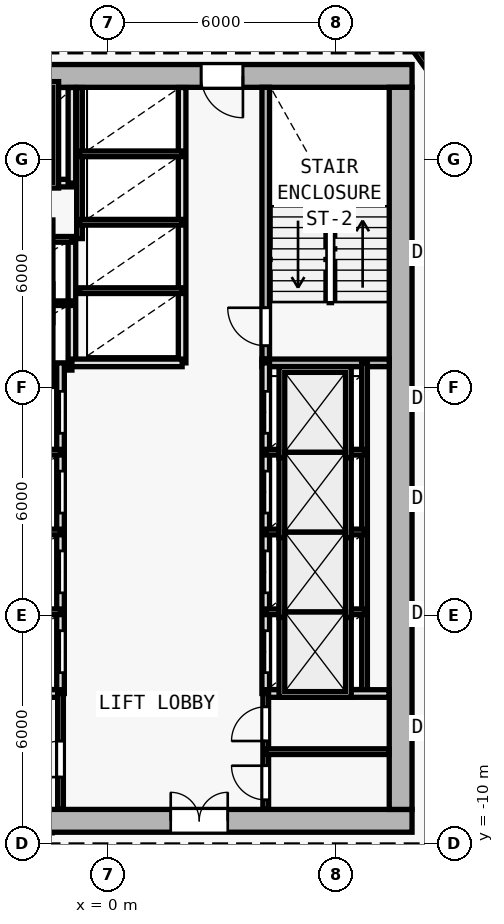
"""IFC4 building model, lengths in metres.
Left out: names, types, materials, properties, quantities, classifications, styles, units other than length and angle.
Written with IfcOpenShell. Run it as: python <this file> out.ifc"""

import sys

from ifc_helpers import new_model, si_unit, direction, frame, frame_2d, origin, origin_2d, place, context, subcontext, project, spatial, rectangle, i_section, extrude, element, fill, save


model = new_model("IFC4")
c1 = context("Model", 3, precision=1e-05, world=origin(), true_north=direction((0.0, 1.0)))
c2 = subcontext(c1, "Body", "Model", "MODEL_VIEW")
j1 = project(units=[si_unit("LENGTHUNIT", "METRE"), si_unit("PLANEANGLEUNIT", "RADIAN")], contexts=[c1])
p1 = place(None, origin())
s1 = spatial("IfcSite", under=j1, at=p1, CompositionType="ELEMENT")
p2 = place(p1, origin())
s2 = spatial("IfcBuilding", under=s1, at=p2, CompositionType="ELEMENT")
p3 = place(p2, frame((0.0, 0.0, 93.3)))
s3 = spatial("IfcBuildingStorey", under=s2, at=p3, CompositionType="ELEMENT", Elevation=93.3)
for number, where, z_axis, x_axis in (
    (1, (7.7, -9.4, 0.0), (0.0, 0.0, 1.0), (1.0, 0.0, 0.0)),
    (2, (7.7, 10.2, 0.0), (0.0, 0.0, 1.0), (1.0, 0.0, 0.0)),
    (3, (0.0, -9.4, 0.0), (0.0, 0.0, 1.0), (1.0, 0.0, 0.0)),
    (4, (7.7, 0.4, 0.0), (0.0, 0.0, 1.0), (1.0, 0.0, 0.0)),
):
    element("IfcColumn", number, at=place(p3, frame(where, z_axis=z_axis, x_axis=x_axis)), inside=s3, PredefinedType="COLUMN", context=c2, shape_type="SweptSolid", body=[
        extrude(i_section(OverallWidth=0.409, OverallDepth=0.425, WebThickness=0.021, FlangeThickness=0.034, FilletRadius=0.015, at=origin_2d()), origin(), (0.0, 0.0, 1.0), 3.6),
    ])
p4 = place(p3, frame((-8.0, -9.4, 0.0), z_axis=(0.0, 0.0, 1.0), x_axis=(1.0, 0.0, 0.0)))
e5 = element("IfcWall", 5, at=p4, inside=s3, PredefinedType="SHEAR", context=c2, shape_type="SweptSolid", body=[
    extrude(rectangle(XDim=16.0, YDim=0.6, at=frame_2d((8.0, 0.0))), origin(), (0.0, 0.0, 1.0), 3.35),
])
p5 = place(p4, frame((9.65, 0.0, 0.0)))
e6 = element("IfcOpeningElement", 6, at=p5, cuts=e5, PredefinedType="OPENING", context=c2, shape_type="SweptSolid", body=[
    extrude(rectangle(XDim=1.5, YDim=2.2, at=frame_2d((0.75, 1.1))), frame((0.0, 0.31, 0.0), z_axis=(0.0, -1.0, 0.0), x_axis=(1.0, 0.0, 0.0)), (0.0, 0.0, 1.0), 0.62),
])
p6 = place(p3, frame((8.0, 10.2, 0.0), z_axis=(0.0, 0.0, 1.0), x_axis=(-1.0, 0.0, 0.0)))
e7 = element("IfcWall", 7, at=p6, inside=s3, PredefinedType="SHEAR", context=c2, shape_type="SweptSolid", body=[
    extrude(rectangle(XDim=16.0, YDim=0.6, at=frame_2d((8.0, 0.0))), origin(), (0.0, 0.0, 1.0), 3.35),
])
p7 = place(p6, frame((4.45, 0.0, 0.0)))
e8 = element("IfcOpeningElement", 8, at=p7, cuts=e7, PredefinedType="OPENING", context=c2, shape_type="SweptSolid", body=[
    extrude(rectangle(XDim=1.1, YDim=2.15, at=frame_2d((0.55, 1.075))), frame((0.0, 0.31, 0.0), z_axis=(0.0, -1.0, 0.0), x_axis=(1.0, 0.0, 0.0)), (0.0, 0.0, 1.0), 0.62),
])
p8 = place(p3, frame((7.7, 9.9, 0.0), z_axis=(0.0, 0.0, 1.0), x_axis=(0.0, -1.0, 0.0)))
e9 = element("IfcWall", 9, at=p8, inside=s3, PredefinedType="SHEAR", context=c2, shape_type="SweptSolid", body=[
    extrude(rectangle(XDim=19.0, YDim=0.6, at=frame_2d((9.5, 0.0))), origin(), (0.0, 0.0, 1.0), 3.35),
])
p9 = place(p3, frame((4.15, 2.75, 0.0), z_axis=(0.0, 0.0, 1.0), x_axis=(0.0, 1.0, 0.0)))
e10 = element("IfcWall", 10, at=p9, inside=s3, PredefinedType="SOLIDWALL", context=c2, shape_type="SweptSolid", body=[
    extrude(rectangle(XDim=7.15, YDim=0.2, at=frame_2d((3.575, 0.0))), origin(), (0.0, 0.0, 1.0), 3.35),
])
p10 = place(p9, frame((0.35, 0.0, 0.0)))
e11 = element("IfcOpeningElement", 11, at=p10, cuts=e10, PredefinedType="OPENING", context=c2, shape_type="SweptSolid", body=[
    extrude(rectangle(XDim=1.0, YDim=2.15, at=frame_2d((0.5, 1.075))), frame((0.0, 0.11, 0.0), z_axis=(0.0, -1.0, 0.0), x_axis=(1.0, 0.0, 0.0)), (0.0, 0.0, 1.0), 0.22),
])
p11 = place(p3, frame((4.05, 2.65, 0.0), z_axis=(0.0, 0.0, 1.0), x_axis=(1.0, 0.0, 0.0)))
e12 = element("IfcWall", 12, at=p11, inside=s3, PredefinedType="SOLIDWALL", context=c2, shape_type="SweptSolid", body=[
    extrude(rectangle(XDim=3.35, YDim=0.2, at=frame_2d((1.675, 0.0))), origin(), (0.0, 0.0, 1.0), 3.35),
])
p12 = place(p3, frame((-0.95, 2.65, 0.0), z_axis=(0.0, 0.0, 1.0), x_axis=(0.0, 1.0, 0.0)))
e13 = element("IfcWall", 13, at=p12, inside=s3, PredefinedType="SOLIDWALL", context=c2, shape_type="SweptSolid", body=[
    extrude(rectangle(XDim=3.27, YDim=0.2, at=frame_2d((1.635, 0.0))), origin(), (0.0, 0.0, 1.0), 3.35),
])
for number, where, z_axis, x_axis in (
    (14, (-3.85, 2.52, 0.0), (0.0, 0.0, 1.0), (1.0, 0.0, 0.0)),
    (15, (-3.85, 4.22, 0.0), (0.0, 0.0, 1.0), (1.0, 0.0, 0.0)),
):
    element("IfcWall", number, at=place(p3, frame(where, z_axis=z_axis, x_axis=x_axis)), inside=s3, PredefinedType="PARTITIONING", context=c2, shape_type="SweptSolid", body=[
        extrude(rectangle(XDim=2.9, YDim=0.12, at=frame_2d((1.45, 0.0))), origin(), (0.0, 0.0, 1.0), 3.35),
    ])
p13 = place(p3, frame((-3.85, 5.9, 0.0), z_axis=(0.0, 0.0, 1.0), x_axis=(1.0, 0.0, 0.0)))
e16 = element("IfcWall", 16, at=p13, inside=s3, PredefinedType="PARTITIONING", context=c2, shape_type="SweptSolid", body=[
    extrude(rectangle(XDim=2.9, YDim=0.15, at=frame_2d((1.45, 0.0))), origin(), (0.0, 0.0, 1.0), 3.35),
])
p14 = place(p3, frame((-3.85, 7.38, 0.0), z_axis=(0.0, 0.0, 1.0), x_axis=(1.0, 0.0, 0.0)))
e17 = element("IfcWall", 17, at=p14, inside=s3, PredefinedType="SOLIDWALL", context=c2, shape_type="SweptSolid", body=[
    extrude(rectangle(XDim=2.9, YDim=0.2, at=frame_2d((1.45, 0.0))), origin(), (0.0, 0.0, 1.0), 3.35),
])
p15 = place(p14, frame((0.85, 0.0, 0.0)))
e18 = element("IfcOpeningElement", 18, at=p15, cuts=e17, PredefinedType="OPENING", context=c2, shape_type="SweptSolid", body=[
    extrude(rectangle(XDim=1.2, YDim=2.2, at=frame_2d((0.6, 1.1))), frame((0.0, 0.11, 0.0), z_axis=(0.0, -1.0, 0.0), x_axis=(1.0, 0.0, 0.0)), (0.0, 0.0, 1.0), 0.22),
])
p16 = place(p3, frame((-0.95, 7.38, 0.0), z_axis=(0.0, 0.0, 1.0), x_axis=(0.0, 1.0, 0.0)))
e19 = element("IfcWall", 19, at=p16, inside=s3, PredefinedType="SOLIDWALL", context=c2, shape_type="SweptSolid", body=[
    extrude(rectangle(XDim=2.515, YDim=0.2, at=frame_2d((1.258, 0.0))), origin(), (0.0, 0.0, 1.0), 3.35),
])
p17 = place(p3, frame((4.15, -6.05, 0.0), z_axis=(0.0, 0.0, 1.0), x_axis=(0.0, 1.0, 0.0)))
e20 = element("IfcWall", 20, at=p17, inside=s3, PredefinedType="SOLIDWALL", context=c2, shape_type="SweptSolid", body=[
    extrude(rectangle(XDim=8.7, YDim=0.2, at=frame_2d((4.35, 0.0))), origin(), (0.0, 0.0, 1.0), 3.35),
])
p18 = place(p17, frame((0.55, 0.0, 0.0)))
e21 = element("IfcOpeningElement", 21, at=p18, cuts=e20, PredefinedType="OPENING", context=c2, shape_type="SweptSolid", body=[
    extrude(rectangle(XDim=1.1, YDim=2.15, at=frame_2d((0.55, 1.075))), frame((0.0, 0.11, 0.0), z_axis=(0.0, -1.0, 0.0), x_axis=(1.0, 0.0, 0.0)), (0.0, 0.0, 1.0), 0.22),
])
p19 = place(p17, frame((2.65, 0.0, 0.0)))
e22 = element("IfcOpeningElement", 22, at=p19, cuts=e20, PredefinedType="OPENING", context=c2, shape_type="SweptSolid", body=[
    extrude(rectangle(XDim=1.1, YDim=2.15, at=frame_2d((0.55, 1.075))), frame((0.0, 0.11, 0.0), z_axis=(0.0, -1.0, 0.0), x_axis=(1.0, 0.0, 0.0)), (0.0, 0.0, 1.0), 0.22),
])
p20 = place(p17, frame((4.75, 0.0, 0.0)))
e23 = element("IfcOpeningElement", 23, at=p20, cuts=e20, PredefinedType="OPENING", context=c2, shape_type="SweptSolid", body=[
    extrude(rectangle(XDim=1.1, YDim=2.15, at=frame_2d((0.55, 1.075))), frame((0.0, 0.11, 0.0), z_axis=(0.0, -1.0, 0.0), x_axis=(1.0, 0.0, 0.0)), (0.0, 0.0, 1.0), 0.22),
])
p21 = place(p17, frame((6.85, 0.0, 0.0)))
e24 = element("IfcOpeningElement", 24, at=p21, cuts=e20, PredefinedType="OPENING", context=c2, shape_type="SweptSolid", body=[
    extrude(rectangle(XDim=1.1, YDim=2.15, at=frame_2d((0.55, 1.075))), frame((0.0, 0.11, 0.0), z_axis=(0.0, -1.0, 0.0), x_axis=(1.0, 0.0, 0.0)), (0.0, 0.0, 1.0), 0.22),
])
p22 = place(p3, frame((6.75, -6.05, 0.0), z_axis=(0.0, 0.0, 1.0), x_axis=(0.0, 1.0, 0.0)))
e25 = element("IfcWall", 25, at=p22, inside=s3, PredefinedType="PARTITIONING", context=c2, shape_type="SweptSolid", body=[
    extrude(rectangle(XDim=8.7, YDim=0.15, at=frame_2d((4.35, 0.0))), origin(), (0.0, 0.0, 1.0), 3.35),
])
for number, where, z_axis, x_axis in (
    (26, (4.15, -3.9, 0.0), (0.0, 0.0, 1.0), (1.0, 0.0, 0.0)),
    (27, (4.15, -1.8, 0.0), (0.0, 0.0, 1.0), (1.0, 0.0, 0.0)),
    (28, (4.15, 0.3, 0.0), (0.0, 0.0, 1.0), (1.0, 0.0, 0.0)),
):
    element("IfcWall", number, at=place(p3, frame(where, z_axis=z_axis, x_axis=x_axis)), inside=s3, PredefinedType="PARTITIONING", context=c2, shape_type="SweptSolid", body=[
        extrude(rectangle(XDim=2.6, YDim=0.15, at=frame_2d((1.3, 0.0))), origin(), (0.0, 0.0, 1.0), 3.35),
    ])
p23 = place(p3, frame((-1.25, -6.05, 0.0), z_axis=(0.0, 0.0, 1.0), x_axis=(0.0, 1.0, 0.0)))
e29 = element("IfcWall", 29, at=p23, inside=s3, PredefinedType="SOLIDWALL", context=c2, shape_type="SweptSolid", body=[
    extrude(rectangle(XDim=8.7, YDim=0.2, at=frame_2d((4.35, 0.0))), origin(), (0.0, 0.0, 1.0), 3.35),
])
p24 = place(p23, frame((0.55, 0.0, 0.0)))
e30 = element("IfcOpeningElement", 30, at=p24, cuts=e29, PredefinedType="OPENING", context=c2, shape_type="SweptSolid", body=[
    extrude(rectangle(XDim=1.1, YDim=2.15, at=frame_2d((0.55, 1.075))), frame((0.0, 0.11, 0.0), z_axis=(0.0, -1.0, 0.0), x_axis=(1.0, 0.0, 0.0)), (0.0, 0.0, 1.0), 0.22),
])
p25 = place(p23, frame((2.65, 0.0, 0.0)))
e31 = element("IfcOpeningElement", 31, at=p25, cuts=e29, PredefinedType="OPENING", context=c2, shape_type="SweptSolid", body=[
    extrude(rectangle(XDim=1.1, YDim=2.15, at=frame_2d((0.55, 1.075))), frame((0.0, 0.11, 0.0), z_axis=(0.0, -1.0, 0.0), x_axis=(1.0, 0.0, 0.0)), (0.0, 0.0, 1.0), 0.22),
])
p26 = place(p23, frame((4.75, 0.0, 0.0)))
e32 = element("IfcOpeningElement", 32, at=p26, cuts=e29, PredefinedType="OPENING", context=c2, shape_type="SweptSolid", body=[
    extrude(rectangle(XDim=1.1, YDim=2.15, at=frame_2d((0.55, 1.075))), frame((0.0, 0.11, 0.0), z_axis=(0.0, -1.0, 0.0), x_axis=(1.0, 0.0, 0.0)), (0.0, 0.0, 1.0), 0.22),
])
p27 = place(p23, frame((6.85, 0.0, 0.0)))
e33 = element("IfcOpeningElement", 33, at=p27, cuts=e29, PredefinedType="OPENING", context=c2, shape_type="SweptSolid", body=[
    extrude(rectangle(XDim=1.1, YDim=2.15, at=frame_2d((0.55, 1.075))), frame((0.0, 0.11, 0.0), z_axis=(0.0, -1.0, 0.0), x_axis=(1.0, 0.0, 0.0)), (0.0, 0.0, 1.0), 0.22),
])
for number, where, z_axis, x_axis in (
    (34, (-4.15, -3.9, 0.0), (0.0, 0.0, 1.0), (1.0, 0.0, 0.0)),
    (35, (-4.15, -1.8, 0.0), (0.0, 0.0, 1.0), (1.0, 0.0, 0.0)),
    (36, (-4.15, 0.3, 0.0), (0.0, 0.0, 1.0), (1.0, 0.0, 0.0)),
):
    element("IfcWall", number, at=place(p3, frame(where, z_axis=z_axis, x_axis=x_axis)), inside=s3, PredefinedType="PARTITIONING", context=c2, shape_type="SweptSolid", body=[
        extrude(rectangle(XDim=2.9, YDim=0.15, at=frame_2d((1.45, 0.0))), origin(), (0.0, 0.0, 1.0), 3.35),
    ])
p28 = place(p3, frame((1.95, 2.65, 0.0), z_axis=(0.0, 0.0, 1.0), x_axis=(0.0, 1.0, 0.0)))
e37 = element("IfcWall", 37, at=p28, inside=s3, PredefinedType="SOLIDWALL", context=c2, shape_type="SweptSolid", body=[
    extrude(rectangle(XDim=7.245, YDim=0.2, at=frame_2d((3.623, 0.0))), origin(), (0.0, 0.0, 1.0), 3.35),
])
p29 = place(p3, frame((-0.95, 2.65, 0.0), z_axis=(0.0, 0.0, 1.0), x_axis=(1.0, 0.0, 0.0)))
e38 = element("IfcWall", 38, at=p29, inside=s3, PredefinedType="SOLIDWALL", context=c2, shape_type="SweptSolid", body=[
    extrude(rectangle(XDim=2.9, YDim=0.2, at=frame_2d((1.45, 0.0))), origin(), (0.0, 0.0, 1.0), 3.35),
])
p30 = place(p3, frame((-0.75, 5.92, 0.0), z_axis=(0.0, 0.0, 1.0), x_axis=(0.0, 1.0, 0.0)))
e39 = element("IfcWall", 39, at=p30, inside=s3, PredefinedType="PARTITIONING", context=c2, shape_type="SweptSolid", body=[
    extrude(rectangle(XDim=3.975, YDim=0.15, at=frame_2d((1.988, 0.0))), origin(), (0.0, 0.0, 1.0), 3.35),
])
for number, where, z_axis, x_axis in (
    (40, (-0.75, 4.55, 0.0), (0.0, 0.0, 1.0), (1.0, 0.0, 0.0)),
    (41, (-0.75, 6.35, 0.0), (0.0, 0.0, 1.0), (1.0, 0.0, 0.0)),
    (42, (-0.75, 8.15, 0.0), (0.0, 0.0, 1.0), (1.0, 0.0, 0.0)),
):
    element("IfcWall", number, at=place(p3, frame(where, z_axis=z_axis, x_axis=x_axis)), inside=s3, PredefinedType="PARTITIONING", context=c2, shape_type="SweptSolid", body=[
        extrude(rectangle(XDim=2.7, YDim=0.15, at=frame_2d((1.35, 0.0))), origin(), (0.0, 0.0, 1.0), 3.35),
    ])
p31 = place(p3, frame((-4.04, -6.05, 0.0), z_axis=(0.0, 0.0, 1.0), x_axis=(1.0, 0.0, 0.0)))
e43 = element("IfcWall", 43, at=p31, inside=s3, PredefinedType="SOLIDWALL", context=c2, shape_type="SweptSolid", body=[
    extrude(rectangle(XDim=2.79, YDim=0.2, at=frame_2d((1.395, 0.0))), origin(), (0.0, 0.0, 1.0), 3.35),
])
p32 = place(p3, frame((4.15, -6.05, 0.0), z_axis=(0.0, 0.0, 1.0), x_axis=(1.0, 0.0, 0.0)))
e44 = element("IfcWall", 44, at=p32, inside=s3, PredefinedType="SOLIDWALL", context=c2, shape_type="SweptSolid", body=[
    extrude(rectangle(XDim=3.245, YDim=0.2, at=frame_2d((1.623, 0.0))), origin(), (0.0, 0.0, 1.0), 3.35),
])
p33 = place(p3, frame((-1.25, -9.095, 0.0), z_axis=(0.0, 0.0, 1.0), x_axis=(0.0, 1.0, 0.0)))
e45 = element("IfcWall", 45, at=p33, inside=s3, PredefinedType="PARTITIONING", context=c2, shape_type="SweptSolid", body=[
    extrude(rectangle(XDim=3.045, YDim=0.15, at=frame_2d((1.522, 0.0))), origin(), (0.0, 0.0, 1.0), 3.35),
])
p34 = place(p33, frame((0.845, 0.0, 0.0)))
e46 = element("IfcOpeningElement", 46, at=p34, cuts=e45, PredefinedType="OPENING", context=c2, shape_type="SweptSolid", body=[
    extrude(rectangle(XDim=0.95, YDim=2.1, at=frame_2d((0.475, 1.05))), frame((0.0, 0.085, 0.0), z_axis=(0.0, -1.0, 0.0), x_axis=(1.0, 0.0, 0.0)), (0.0, 0.0, 1.0), 0.17),
])
p35 = place(p3, frame((4.15, -9.095, 0.0), z_axis=(0.0, 0.0, 1.0), x_axis=(0.0, 1.0, 0.0)))
e47 = element("IfcWall", 47, at=p35, inside=s3, PredefinedType="PARTITIONING", context=c2, shape_type="SweptSolid", body=[
    extrude(rectangle(XDim=3.045, YDim=0.15, at=frame_2d((1.522, 0.0))), origin(), (0.0, 0.0, 1.0), 3.35),
])
p36 = place(p35, frame((0.245, 0.0, 0.0)))
e48 = element("IfcOpeningElement", 48, at=p36, cuts=e47, PredefinedType="OPENING", context=c2, shape_type="SweptSolid", body=[
    extrude(rectangle(XDim=0.9, YDim=2.1, at=frame_2d((0.45, 1.05))), frame((0.0, 0.085, 0.0), z_axis=(0.0, -1.0, 0.0), x_axis=(1.0, 0.0, 0.0)), (0.0, 0.0, 1.0), 0.17),
])
p37 = place(p35, frame((1.795, 0.0, 0.0)))
e49 = element("IfcOpeningElement", 49, at=p37, cuts=e47, PredefinedType="OPENING", context=c2, shape_type="SweptSolid", body=[
    extrude(rectangle(XDim=0.9, YDim=2.1, at=frame_2d((0.45, 1.05))), frame((0.0, 0.085, 0.0), z_axis=(0.0, -1.0, 0.0), x_axis=(1.0, 0.0, 0.0)), (0.0, 0.0, 1.0), 0.17),
])
p38 = place(p3, frame((4.15, -7.58, 0.0), z_axis=(0.0, 0.0, 1.0), x_axis=(1.0, 0.0, 0.0)))
e50 = element("IfcWall", 50, at=p38, inside=s3, PredefinedType="PARTITIONING", context=c2, shape_type="SweptSolid", body=[
    extrude(rectangle(XDim=3.245, YDim=0.15, at=frame_2d((1.623, 0.0))), origin(), (0.0, 0.0, 1.0), 3.35),
])
p39 = place(p3, frame((7.041, 12.36, 0.0), z_axis=(0.0, 0.0, 1.0), x_axis=(0.582449511476, -0.812866881218, 0.0)))
e51 = element("IfcWall", 51, at=p39, inside=s3, PredefinedType="PARTITIONING", context=c2, shape_type="SweptSolid", body=[
    extrude(rectangle(XDim=4.84, YDim=0.15, at=frame_2d((2.42, 0.0))), origin(), (0.0, 0.0, 1.0), 2.925),
])
p40 = place(p5, origin())
e52 = element("IfcDoor", 52, at=p40, inside=s3, OperationType="DOUBLE_DOOR_SINGLE_SWING", PredefinedType="DOOR", context=c2, shape_type="SweptSolid", body=[
    extrude(rectangle(XDim=1.5, YDim=2.2, at=frame_2d((0.75, 1.1))), frame((0.0, 0.025, 0.0), z_axis=(0.0, -1.0, 0.0), x_axis=(1.0, 0.0, 0.0)), (0.0, 0.0, 1.0), 0.05),
])
fill(e6, e52)
p41 = place(p7, origin())
e53 = element("IfcDoor", 53, at=p41, inside=s3, OperationType="SINGLE_SWING_LEFT", PredefinedType="DOOR", context=c2, shape_type="SweptSolid", body=[
    extrude(rectangle(XDim=1.1, YDim=2.15, at=frame_2d((0.55, 1.075))), frame((0.0, 0.025, 0.0), z_axis=(0.0, -1.0, 0.0), x_axis=(1.0, 0.0, 0.0)), (0.0, 0.0, 1.0), 0.05),
])
fill(e8, e53)
p42 = place(p10, origin())
e54 = element("IfcDoor", 54, at=p42, inside=s3, OperationType="SINGLE_SWING_RIGHT", PredefinedType="DOOR", context=c2, shape_type="SweptSolid", body=[
    extrude(rectangle(XDim=1.0, YDim=2.15, at=frame_2d((0.5, 1.075))), frame((0.0, 0.025, 0.0), z_axis=(0.0, -1.0, 0.0), x_axis=(1.0, 0.0, 0.0)), (0.0, 0.0, 1.0), 0.05),
])
fill(e11, e54)
p43 = place(p18, origin())
e55 = element("IfcDoor", 55, at=p43, inside=s3, OperationType="DOUBLE_DOOR_SLIDING", PredefinedType="DOOR", context=c2, shape_type="SweptSolid", body=[
    extrude(rectangle(XDim=1.1, YDim=2.15, at=frame_2d((0.55, 1.075))), frame((0.0, 0.025, 0.0), z_axis=(0.0, -1.0, 0.0), x_axis=(1.0, 0.0, 0.0)), (0.0, 0.0, 1.0), 0.05),
])
fill(e21, e55)
p44 = place(p19, origin())
e56 = element("IfcDoor", 56, at=p44, inside=s3, OperationType="DOUBLE_DOOR_SLIDING", PredefinedType="DOOR", context=c2, shape_type="SweptSolid", body=[
    extrude(rectangle(XDim=1.1, YDim=2.15, at=frame_2d((0.55, 1.075))), frame((0.0, 0.025, 0.0), z_axis=(0.0, -1.0, 0.0), x_axis=(1.0, 0.0, 0.0)), (0.0, 0.0, 1.0), 0.05),
])
fill(e22, e56)
p45 = place(p20, origin())
e57 = element("IfcDoor", 57, at=p45, inside=s3, OperationType="DOUBLE_DOOR_SLIDING", PredefinedType="DOOR", context=c2, shape_type="SweptSolid", body=[
    extrude(rectangle(XDim=1.1, YDim=2.15, at=frame_2d((0.55, 1.075))), frame((0.0, 0.025, 0.0), z_axis=(0.0, -1.0, 0.0), x_axis=(1.0, 0.0, 0.0)), (0.0, 0.0, 1.0), 0.05),
])
fill(e23, e57)
p46 = place(p21, origin())
e58 = element("IfcDoor", 58, at=p46, inside=s3, OperationType="DOUBLE_DOOR_SLIDING", PredefinedType="DOOR", context=c2, shape_type="SweptSolid", body=[
    extrude(rectangle(XDim=1.1, YDim=2.15, at=frame_2d((0.55, 1.075))), frame((0.0, 0.025, 0.0), z_axis=(0.0, -1.0, 0.0), x_axis=(1.0, 0.0, 0.0)), (0.0, 0.0, 1.0), 0.05),
])
fill(e24, e58)
p47 = place(p24, origin())
e59 = element("IfcDoor", 59, at=p47, inside=s3, OperationType="DOUBLE_DOOR_SLIDING", PredefinedType="DOOR", context=c2, shape_type="SweptSolid", body=[
    extrude(rectangle(XDim=1.1, YDim=2.15, at=frame_2d((0.55, 1.075))), frame((0.0, 0.025, 0.0), z_axis=(0.0, -1.0, 0.0), x_axis=(1.0, 0.0, 0.0)), (0.0, 0.0, 1.0), 0.05),
])
fill(e30, e59)
p48 = place(p25, origin())
e60 = element("IfcDoor", 60, at=p48, inside=s3, OperationType="DOUBLE_DOOR_SLIDING", PredefinedType="DOOR", context=c2, shape_type="SweptSolid", body=[
    extrude(rectangle(XDim=1.1, YDim=2.15, at=frame_2d((0.55, 1.075))), frame((0.0, 0.025, 0.0), z_axis=(0.0, -1.0, 0.0), x_axis=(1.0, 0.0, 0.0)), (0.0, 0.0, 1.0), 0.05),
])
fill(e31, e60)
p49 = place(p26, origin())
e61 = element("IfcDoor", 61, at=p49, inside=s3, OperationType="DOUBLE_DOOR_SLIDING", PredefinedType="DOOR", context=c2, shape_type="SweptSolid", body=[
    extrude(rectangle(XDim=1.1, YDim=2.15, at=frame_2d((0.55, 1.075))), frame((0.0, 0.025, 0.0), z_axis=(0.0, -1.0, 0.0), x_axis=(1.0, 0.0, 0.0)), (0.0, 0.0, 1.0), 0.05),
])
fill(e32, e61)
p50 = place(p27, origin())
e62 = element("IfcDoor", 62, at=p50, inside=s3, OperationType="DOUBLE_DOOR_SLIDING", PredefinedType="DOOR", context=c2, shape_type="SweptSolid", body=[
    extrude(rectangle(XDim=1.1, YDim=2.15, at=frame_2d((0.55, 1.075))), frame((0.0, 0.025, 0.0), z_axis=(0.0, -1.0, 0.0), x_axis=(1.0, 0.0, 0.0)), (0.0, 0.0, 1.0), 0.05),
])
fill(e33, e62)
p51 = place(p34, origin())
e63 = element("IfcDoor", 63, at=p51, inside=s3, OperationType="SINGLE_SWING_LEFT", PredefinedType="DOOR", context=c2, shape_type="SweptSolid", body=[
    extrude(rectangle(XDim=0.95, YDim=2.1, at=frame_2d((0.475, 1.05))), frame((0.0, 0.025, 0.0), z_axis=(0.0, -1.0, 0.0), x_axis=(1.0, 0.0, 0.0)), (0.0, 0.0, 1.0), 0.05),
])
fill(e46, e63)
p52 = place(p36, origin())
e64 = element("IfcDoor", 64, at=p52, inside=s3, OperationType="SINGLE_SWING_RIGHT", PredefinedType="DOOR", context=c2, shape_type="SweptSolid", body=[
    extrude(rectangle(XDim=0.9, YDim=2.1, at=frame_2d((0.45, 1.05))), frame((0.0, 0.025, 0.0), z_axis=(0.0, -1.0, 0.0), x_axis=(1.0, 0.0, 0.0)), (0.0, 0.0, 1.0), 0.05),
])
fill(e48, e64)
p53 = place(p37, origin())
e65 = element("IfcDoor", 65, at=p53, inside=s3, OperationType="SINGLE_SWING_LEFT", PredefinedType="DOOR", context=c2, shape_type="SweptSolid", body=[
    extrude(rectangle(XDim=0.9, YDim=2.1, at=frame_2d((0.45, 1.05))), frame((0.0, 0.025, 0.0), z_axis=(0.0, -1.0, 0.0), x_axis=(1.0, 0.0, 0.0)), (0.0, 0.0, 1.0), 0.05),
])
fill(e49, e65)
save(model, sys.argv[1])
